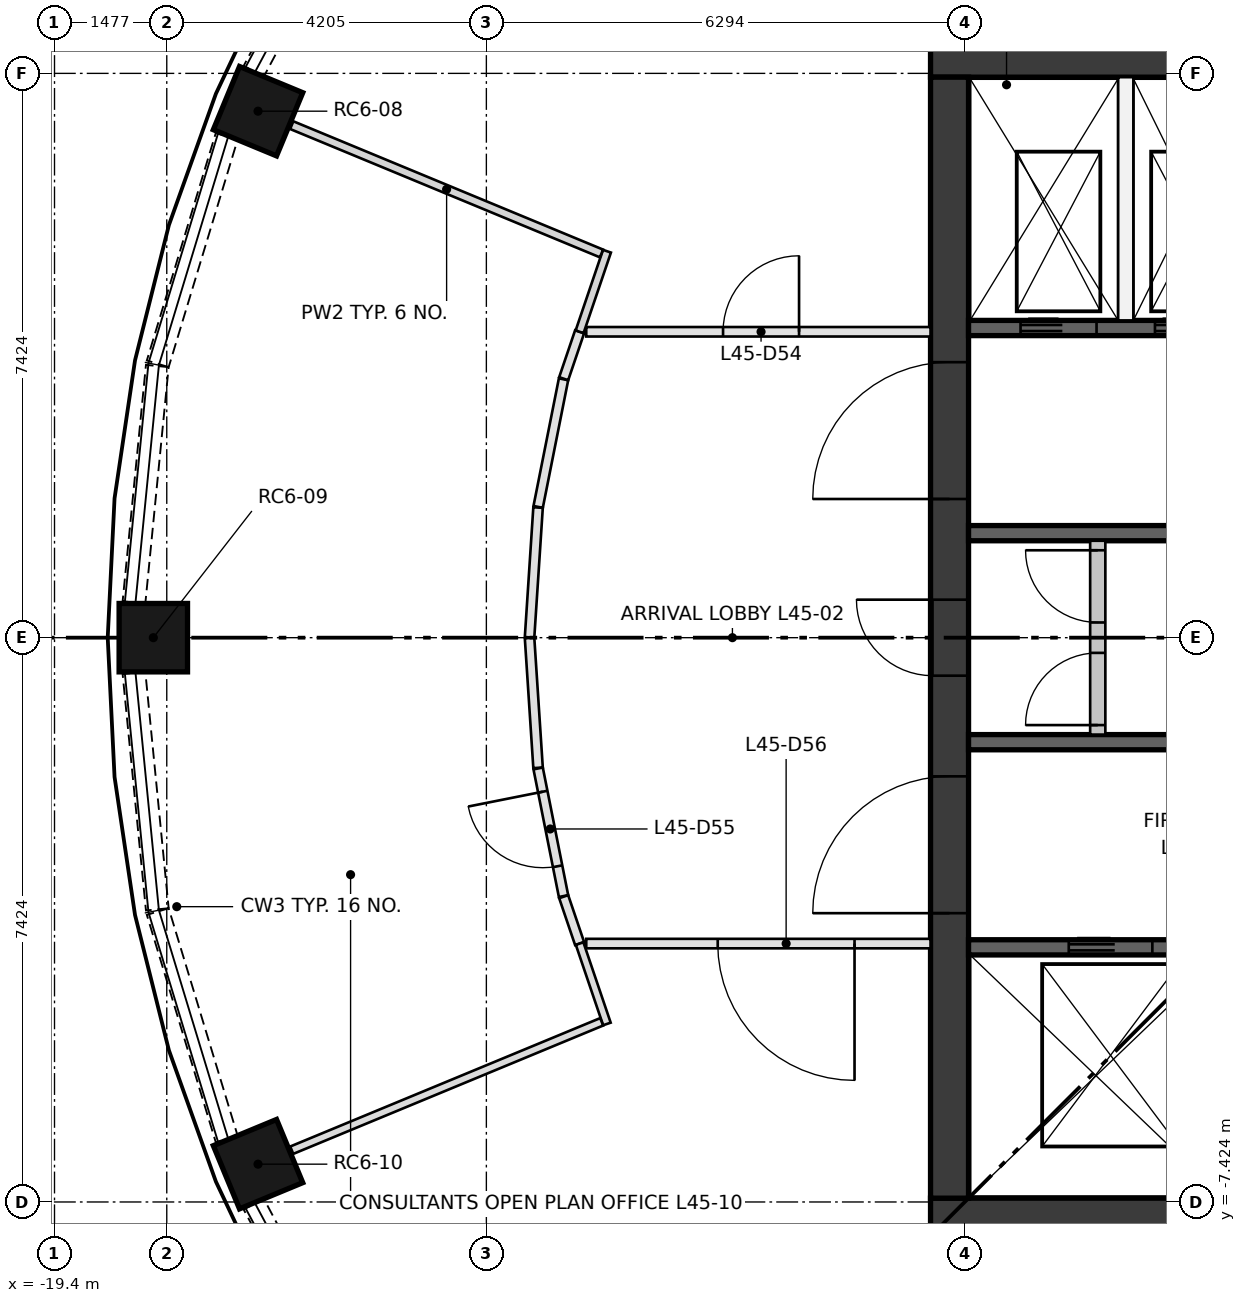
"""IFC4 building model, lengths in metres.
Left out: names, types, materials, properties, quantities, classifications, styles, units other than length and angle.
Written with IfcOpenShell. Run it as: python <this file> out.ifc"""

import sys

from ifc_helpers import new_model, si_unit, direction, frame, frame_2d, origin, origin_2d, place, context, subcontext, project, spatial, rectangle, extrude, element, fill, save


model = new_model("IFC4")
c1 = context("Model", 3, precision=1e-05, world=origin(), true_north=direction((0.0, 1.0)))
c2 = subcontext(c1, "Body", "Model", "MODEL_VIEW")
j1 = project(units=[si_unit("LENGTHUNIT", "METRE"), si_unit("PLANEANGLEUNIT", "RADIAN")], contexts=[c1])
p1 = place(None, origin())
s1 = spatial("IfcSite", under=j1, at=p1, CompositionType="ELEMENT")
p2 = place(p1, origin())
s2 = spatial("IfcBuilding", under=s1, at=p2, CompositionType="ELEMENT")
p3 = place(p2, frame((0.0, 0.0, 170.9)))
s3 = spatial("IfcBuildingStorey", under=s2, at=p3, CompositionType="ELEMENT", Elevation=170.9)
for number, where, z_axis, x_axis in (
    (1, (-16.722, 6.927, 0.0), (0.0, 0.0, 1.0), (-0.924, 0.383, 0.0)),
    (2, (-18.1, 0.0, 0.0), (0.0, 0.0, 1.0), (-1.0, 0.0, 0.0)),
    (3, (-16.722, -6.927, 0.0), (0.0, 0.0, 1.0), (-0.924, -0.383, 0.0)),
):
    element("IfcColumn", number, at=place(p3, frame(where, z_axis=z_axis, x_axis=x_axis)), inside=s3, PredefinedType="COLUMN", context=c2, shape_type="SweptSolid", body=[
        extrude(rectangle(XDim=0.9, YDim=0.9, at=origin_2d()), origin(), (0.0, 0.0, 1.0), 3.35),
    ])
for number, where, z_axis, x_axis in (
    (4, (-7.874, -7.624, 0.0), (0.0, 0.0, 1.0), (1.0, 0.0, 0.0)),
    (5, (-7.874, 7.624, 0.0), (0.0, 0.0, 1.0), (1.0, 0.0, 0.0)),
):
    element("IfcWall", number, at=place(p3, frame(where, z_axis=z_axis, x_axis=x_axis)), inside=s3, PredefinedType="SHEAR", context=c2, shape_type="SweptSolid", body=[
        extrude(rectangle(XDim=15.748, YDim=0.5, at=frame_2d((7.874, 0.0))), origin(), (0.0, 0.0, 1.0), 3.35),
    ])
p4 = place(p3, frame((-7.624, -7.374, 0.0), z_axis=(0.0, 0.0, 1.0), x_axis=(0.0, 1.0, 0.0)))
e6 = element("IfcWall", 6, at=p4, inside=s3, PredefinedType="SHEAR", context=c2, shape_type="SweptSolid", body=[
    extrude(rectangle(XDim=14.748, YDim=0.5, at=frame_2d((7.374, 0.0))), origin(), (0.0, 0.0, 1.0), 3.35),
])
p5 = place(p4, frame((6.874, 0.0, 0.0)))
e7 = element("IfcOpeningElement", 7, at=p5, cuts=e6, PredefinedType="OPENING", context=c2, shape_type="SweptSolid", body=[
    extrude(rectangle(XDim=1.0, YDim=2.1, at=frame_2d((0.5, 1.05))), frame((0.0, 0.26, 0.0), z_axis=(0.0, -1.0, 0.0), x_axis=(1.0, 0.0, 0.0)), (0.0, 0.0, 1.0), 0.52),
])
p6 = place(p4, frame((3.75, 0.0, 0.0)))
e8 = element("IfcOpeningElement", 8, at=p6, cuts=e6, PredefinedType="OPENING", context=c2, shape_type="SweptSolid", body=[
    extrude(rectangle(XDim=1.8, YDim=2.1, at=frame_2d((0.9, 1.05))), frame((0.0, 0.26, 0.0), z_axis=(0.0, -1.0, 0.0), x_axis=(1.0, 0.0, 0.0)), (0.0, 0.0, 1.0), 0.52),
])
p7 = place(p4, frame((9.198, 0.0, 0.0)))
e9 = element("IfcOpeningElement", 9, at=p7, cuts=e6, PredefinedType="OPENING", context=c2, shape_type="SweptSolid", body=[
    extrude(rectangle(XDim=1.8, YDim=2.1, at=frame_2d((0.9, 1.05))), frame((0.0, 0.26, 0.0), z_axis=(0.0, -1.0, 0.0), x_axis=(1.0, 0.0, 0.0)), (0.0, 0.0, 1.0), 0.52),
])
p8 = place(p3, frame((-7.374, -4.074, 0.0), z_axis=(0.0, 0.0, 1.0), x_axis=(1.0, 0.0, 0.0)))
e10 = element("IfcWall", 10, at=p8, inside=s3, PredefinedType="SHEAR", context=c2, shape_type="SweptSolid", body=[
    extrude(rectangle(XDim=14.748, YDim=0.2, at=frame_2d((7.374, 0.0))), origin(), (0.0, 0.0, 1.0), 3.0),
])
p9 = place(p8, frame((1.319, 0.0, 0.0)))
e11 = element("IfcOpeningElement", 11, at=p9, cuts=e10, PredefinedType="OPENING", context=c2, shape_type="SweptSolid", body=[
    extrude(rectangle(XDim=1.1, YDim=2.1, at=frame_2d((0.55, 1.05))), frame((0.0, 0.11, 0.0), z_axis=(0.0, -1.0, 0.0), x_axis=(1.0, 0.0, 0.0)), (0.0, 0.0, 1.0), 0.22),
])
p10 = place(p8, frame((4.456, 0.0, 0.0)))
e12 = element("IfcOpeningElement", 12, at=p10, cuts=e10, PredefinedType="OPENING", context=c2, shape_type="SweptSolid", body=[
    extrude(rectangle(XDim=1.1, YDim=2.1, at=frame_2d((0.55, 1.05))), frame((0.0, 0.11, 0.0), z_axis=(0.0, -1.0, 0.0), x_axis=(1.0, 0.0, 0.0)), (0.0, 0.0, 1.0), 0.22),
])
p11 = place(p8, frame((7.551, 0.0, 0.0)))
e13 = element("IfcOpeningElement", 13, at=p11, cuts=e10, PredefinedType="OPENING", context=c2, shape_type="SweptSolid", body=[
    extrude(rectangle(XDim=1.0, YDim=2.1, at=frame_2d((0.5, 1.05))), frame((0.0, 0.11, 0.0), z_axis=(0.0, -1.0, 0.0), x_axis=(1.0, 0.0, 0.0)), (0.0, 0.0, 1.0), 0.22),
])
p12 = place(p8, frame((9.914, 0.0, 0.0)))
e14 = element("IfcOpeningElement", 14, at=p12, cuts=e10, PredefinedType="OPENING", context=c2, shape_type="SweptSolid", body=[
    extrude(rectangle(XDim=1.0, YDim=2.1, at=frame_2d((0.5, 1.05))), frame((0.0, 0.11, 0.0), z_axis=(0.0, -1.0, 0.0), x_axis=(1.0, 0.0, 0.0)), (0.0, 0.0, 1.0), 0.22),
])
p13 = place(p8, frame((11.688, 0.0, 0.0)))
e15 = element("IfcOpeningElement", 15, at=p13, cuts=e10, PredefinedType="OPENING", context=c2, shape_type="SweptSolid", body=[
    extrude(rectangle(XDim=1.0, YDim=2.1, at=frame_2d((0.5, 1.05))), frame((0.0, 0.11, 0.0), z_axis=(0.0, -1.0, 0.0), x_axis=(1.0, 0.0, 0.0)), (0.0, 0.0, 1.0), 0.22),
])
p14 = place(p8, frame((13.461, 0.0, 0.0)))
e16 = element("IfcOpeningElement", 16, at=p14, cuts=e10, PredefinedType="OPENING", context=c2, shape_type="SweptSolid", body=[
    extrude(rectangle(XDim=1.0, YDim=2.1, at=frame_2d((0.5, 1.05))), frame((0.0, 0.11, 0.0), z_axis=(0.0, -1.0, 0.0), x_axis=(1.0, 0.0, 0.0)), (0.0, 0.0, 1.0), 0.22),
])
p15 = place(p3, frame((-7.374, 4.074, 0.0), z_axis=(0.0, 0.0, 1.0), x_axis=(1.0, 0.0, 0.0)))
e17 = element("IfcWall", 17, at=p15, inside=s3, PredefinedType="SHEAR", context=c2, shape_type="SweptSolid", body=[
    extrude(rectangle(XDim=7.374, YDim=0.2, at=frame_2d((3.687, 0.0))), origin(), (0.0, 0.0, 1.0), 3.0),
])
p16 = place(p15, frame((0.684, 0.0, 0.0)))
e18 = element("IfcOpeningElement", 18, at=p16, cuts=e17, PredefinedType="OPENING", context=c2, shape_type="SweptSolid", body=[
    extrude(rectangle(XDim=1.0, YDim=2.1, at=frame_2d((0.5, 1.05))), frame((0.0, 0.11, 0.0), z_axis=(0.0, -1.0, 0.0), x_axis=(1.0, 0.0, 0.0)), (0.0, 0.0, 1.0), 0.22),
])
p17 = place(p15, frame((2.453, 0.0, 0.0)))
e19 = element("IfcOpeningElement", 19, at=p17, cuts=e17, PredefinedType="OPENING", context=c2, shape_type="SweptSolid", body=[
    extrude(rectangle(XDim=1.0, YDim=2.1, at=frame_2d((0.5, 1.05))), frame((0.0, 0.11, 0.0), z_axis=(0.0, -1.0, 0.0), x_axis=(1.0, 0.0, 0.0)), (0.0, 0.0, 1.0), 0.22),
])
p18 = place(p15, frame((4.221, 0.0, 0.0)))
e20 = element("IfcOpeningElement", 20, at=p18, cuts=e17, PredefinedType="OPENING", context=c2, shape_type="SweptSolid", body=[
    extrude(rectangle(XDim=1.0, YDim=2.1, at=frame_2d((0.5, 1.05))), frame((0.0, 0.11, 0.0), z_axis=(0.0, -1.0, 0.0), x_axis=(1.0, 0.0, 0.0)), (0.0, 0.0, 1.0), 0.22),
])
p19 = place(p15, frame((5.99, 0.0, 0.0)))
e21 = element("IfcOpeningElement", 21, at=p19, cuts=e17, PredefinedType="OPENING", context=c2, shape_type="SweptSolid", body=[
    extrude(rectangle(XDim=1.0, YDim=2.1, at=frame_2d((0.5, 1.05))), frame((0.0, 0.11, 0.0), z_axis=(0.0, -1.0, 0.0), x_axis=(1.0, 0.0, 0.0)), (0.0, 0.0, 1.0), 0.22),
])
for number, where, z_axis, x_axis in (
    (22, (-7.374, -1.375, 0.0), (0.0, 0.0, 1.0), (1.0, 0.0, 0.0)),
    (23, (-7.374, 1.375, 0.0), (0.0, 0.0, 1.0), (1.0, 0.0, 0.0)),
):
    element("IfcWall", number, at=place(p3, frame(where, z_axis=z_axis, x_axis=x_axis)), inside=s3, PredefinedType="SHEAR", context=c2, shape_type="SweptSolid", body=[
        extrude(rectangle(XDim=3.0, YDim=0.2, at=frame_2d((1.5, 0.0))), origin(), (0.0, 0.0, 1.0), 3.0),
    ])
p20 = place(p3, frame((-5.305, 4.174, 0.0), z_axis=(0.0, 0.0, 1.0), x_axis=(0.0, 1.0, 0.0)))
e24 = element("IfcWall", 24, at=p20, inside=s3, PredefinedType="PARTITIONING", context=c2, shape_type="SweptSolid", body=[
    extrude(rectangle(XDim=3.2, YDim=0.2, at=frame_2d((1.6, 0.0))), origin(), (0.0, 0.0, 1.0), 3.0),
])
p21 = place(p3, frame((-5.674, -1.275, 0.0), z_axis=(0.0, 0.0, 1.0), x_axis=(0.0, 1.0, 0.0)))
e25 = element("IfcWall", 25, at=p21, inside=s3, PredefinedType="PARTITIONING", context=c2, shape_type="SweptSolid", body=[
    extrude(rectangle(XDim=2.55, YDim=0.2, at=frame_2d((1.275, 0.0))), origin(), (0.0, 0.0, 1.0), 3.0),
])
p22 = place(p21, frame((0.125, 0.0, 0.0)))
e26 = element("IfcOpeningElement", 26, at=p22, cuts=e25, PredefinedType="OPENING", context=c2, shape_type="SweptSolid", body=[
    extrude(rectangle(XDim=0.95, YDim=2.1, at=frame_2d((0.475, 1.05))), frame((0.0, 0.11, 0.0), z_axis=(0.0, -1.0, 0.0), x_axis=(1.0, 0.0, 0.0)), (0.0, 0.0, 1.0), 0.22),
])
p23 = place(p21, frame((1.475, 0.0, 0.0)))
e27 = element("IfcOpeningElement", 27, at=p23, cuts=e25, PredefinedType="OPENING", context=c2, shape_type="SweptSolid", body=[
    extrude(rectangle(XDim=0.95, YDim=2.1, at=frame_2d((0.475, 1.05))), frame((0.0, 0.11, 0.0), z_axis=(0.0, -1.0, 0.0), x_axis=(1.0, 0.0, 0.0)), (0.0, 0.0, 1.0), 0.22),
])
p24 = place(p3, frame((-15.306, 10.209, 0.0), z_axis=(0.0, 0.0, 1.0), x_axis=(-0.47120441036, -0.882024038027, 0.0)))
e28 = element("IfcWall", 28, at=p24, inside=s3, PredefinedType="SOLIDWALL", context=c2, shape_type="SweptSolid", body=[
    extrude(rectangle(XDim=3.125, YDim=0.3, at=frame_2d((1.562, 0.0))), origin(), (0.0, 0.0, 1.0), 0.9),
])
p25 = place(p3, frame((-17.135, 6.596, 0.0), z_axis=(0.0, 0.0, 1.0), x_axis=(-0.290083245834, -0.957001416136, 0.0)))
e29 = element("IfcWall", 29, at=p25, inside=s3, PredefinedType="SOLIDWALL", context=c2, shape_type="SweptSolid", body=[
    extrude(rectangle(XDim=3.127, YDim=0.3, at=frame_2d((1.563, 0.0))), origin(), (0.0, 0.0, 1.0), 0.9),
])
for number, where, z_axis, x_axis in (
    (30, (-18.048, 3.574, 0.0), (0.0, 0.0, 1.0), (-0.098, -0.995, 0.0)),
    (31, (-18.354, -0.464, 0.0), (0.0, 0.0, 1.0), (0.098, -0.995, 0.0)),
):
    element("IfcWall", number, at=place(p3, frame(where, z_axis=z_axis, x_axis=x_axis)), inside=s3, PredefinedType="SOLIDWALL", context=c2, shape_type="SweptSolid", body=[
        extrude(rectangle(XDim=3.125, YDim=0.3, at=frame_2d((1.563, 0.0))), origin(), (0.0, 0.0, 1.0), 0.9),
    ])
p26 = place(p3, frame((-18.042, -3.604, 0.0), z_axis=(0.0, 0.0, 1.0), x_axis=(0.290083245834, -0.957001416136, 0.0)))
e32 = element("IfcWall", 32, at=p26, inside=s3, PredefinedType="SOLIDWALL", context=c2, shape_type="SweptSolid", body=[
    extrude(rectangle(XDim=3.127, YDim=0.3, at=frame_2d((1.563, 0.0))), origin(), (0.0, 0.0, 1.0), 0.9),
])
p27 = place(p3, frame((-16.779, -7.452, 0.0), z_axis=(0.0, 0.0, 1.0), x_axis=(0.47120441036, -0.882024038027, 0.0)))
e33 = element("IfcWall", 33, at=p27, inside=s3, PredefinedType="SOLIDWALL", context=c2, shape_type="SweptSolid", body=[
    extrude(rectangle(XDim=3.125, YDim=0.3, at=frame_2d((1.562, 0.0))), origin(), (0.0, 0.0, 1.0), 0.9),
])
p28 = place(p3, frame((-12.404, 4.024, 0.0), z_axis=(0.0, 0.0, 1.0), x_axis=(1.0, 0.0, 0.0)))
e34 = element("IfcWall", 34, at=p28, inside=s3, PredefinedType="PARTITIONING", context=c2, shape_type="SweptSolid", body=[
    extrude(rectangle(XDim=4.53, YDim=0.125, at=frame_2d((2.265, 0.0))), origin(), (0.0, 0.0, 1.0), 3.0),
])
p29 = place(p28, frame((1.8, 0.0, 0.0)))
e35 = element("IfcOpeningElement", 35, at=p29, cuts=e34, PredefinedType="OPENING", context=c2, shape_type="SweptSolid", body=[
    extrude(rectangle(XDim=1.0, YDim=2.1, at=frame_2d((0.5, 1.05))), frame((0.0, 0.073, 0.0), z_axis=(0.0, -1.0, 0.0), x_axis=(1.0, 0.0, 0.0)), (0.0, 0.0, 1.0), 0.145),
])
for number, where, z_axis, x_axis in (
    (36, (-13.15, 0.004, 0.0), (0.0, 0.0, 1.0), (0.065, 0.998, 0.0)),
    (37, (-13.038, -1.712, 0.0), (0.0, 0.0, 1.0), (-0.065, 0.998, 0.0)),
    (38, (-13.037, 1.72, 0.0), (0.0, 0.0, 1.0), (0.195, 0.981, 0.0)),
):
    element("IfcWall", number, at=place(p3, frame(where, z_axis=z_axis, x_axis=x_axis)), inside=s3, PredefinedType="PARTITIONING", context=c2, shape_type="SweptSolid", body=[
        extrude(rectangle(XDim=1.712, YDim=0.125, at=frame_2d((0.856, 0.0))), origin(), (0.0, 0.0, 1.0), 3.0),
    ])
p30 = place(p3, frame((-12.703, -3.399, 0.0), z_axis=(0.0, 0.0, 1.0), x_axis=(-0.195101249107, 0.980783106806, 0.0)))
e39 = element("IfcWall", 39, at=p30, inside=s3, PredefinedType="PARTITIONING", context=c2, shape_type="SweptSolid", body=[
    extrude(rectangle(XDim=1.712, YDim=0.125, at=frame_2d((0.856, 0.0))), origin(), (0.0, 0.0, 1.0), 3.0),
])
p31 = place(p30, frame((0.4, 0.0, 0.0)))
e40 = element("IfcOpeningElement", 40, at=p31, cuts=e39, PredefinedType="OPENING", context=c2, shape_type="SweptSolid", body=[
    extrude(rectangle(XDim=1.0, YDim=2.1, at=frame_2d((0.5, 1.05))), frame((0.0, 0.073, 0.0), z_axis=(0.0, -1.0, 0.0), x_axis=(1.0, 0.0, 0.0)), (0.0, 0.0, 1.0), 0.145),
])
for number, where, z_axis, x_axis in (
    (41, (-12.701, 3.407, 0.0), (0.0, 0.0, 1.0), (0.322, 0.947, 0.0)),
    (42, (-12.491, -4.024, 0.0), (0.0, 0.0, 1.0), (-0.322, 0.947, 0.0)),
):
    element("IfcWall", number, at=place(p3, frame(where, z_axis=z_axis, x_axis=x_axis)), inside=s3, PredefinedType="PARTITIONING", context=c2, shape_type="SweptSolid", body=[
        extrude(rectangle(XDim=0.652, YDim=0.125, at=frame_2d((0.326, 0.0))), origin(), (0.0, 0.0, 1.0), 3.0),
    ])
p32 = place(p3, frame((-7.874, -4.024, 0.0), z_axis=(0.0, 0.0, 1.0), x_axis=(-1.0, 0.0, 0.0)))
e43 = element("IfcWall", 43, at=p32, inside=s3, PredefinedType="PARTITIONING", context=c2, shape_type="SweptSolid", body=[
    extrude(rectangle(XDim=4.53, YDim=0.125, at=frame_2d((2.265, 0.0))), origin(), (0.0, 0.0, 1.0), 3.0),
])
p33 = place(p32, frame((1.0, 0.0, 0.0)))
e44 = element("IfcOpeningElement", 44, at=p33, cuts=e43, PredefinedType="OPENING", context=c2, shape_type="SweptSolid", body=[
    extrude(rectangle(XDim=1.8, YDim=2.1, at=frame_2d((0.9, 1.05))), frame((0.0, 0.073, 0.0), z_axis=(0.0, -1.0, 0.0), x_axis=(1.0, 0.0, 0.0)), (0.0, 0.0, 1.0), 0.145),
])
p34 = place(p3, frame((-12.491, 4.024, 0.0), z_axis=(0.0, 0.0, 1.0), x_axis=(0.321456988234, 0.946924181081, 0.0)))
e45 = element("IfcWall", 45, at=p34, inside=s3, PredefinedType="PARTITIONING", context=c2, shape_type="SweptSolid", body=[
    extrude(rectangle(XDim=1.119, YDim=0.11, at=frame_2d((0.56, 0.0))), origin(), (0.0, 0.0, 1.0), 3.0),
])
p35 = place(p3, frame((-12.203, 5.055, 0.0), z_axis=(0.0, 0.0, 1.0), x_axis=(-0.923869102729, 0.382708611117, 0.0)))
e46 = element("IfcWall", 46, at=p35, inside=s3, PredefinedType="PARTITIONING", context=c2, shape_type="SweptSolid", body=[
    extrude(rectangle(XDim=4.411, YDim=0.11, at=frame_2d((2.206, 0.0))), origin(), (0.0, 0.0, 1.0), 3.0),
])
p36 = place(p3, frame((-12.491, -4.024, 0.0), z_axis=(0.0, 0.0, 1.0), x_axis=(0.321534356008, -0.946897913139, 0.0)))
e47 = element("IfcWall", 47, at=p36, inside=s3, PredefinedType="PARTITIONING", context=c2, shape_type="SweptSolid", body=[
    extrude(rectangle(XDim=1.117, YDim=0.105, at=frame_2d((0.559, 0.0))), origin(), (0.0, 0.0, 1.0), 3.0),
])
p37 = place(p3, frame((-12.201, -5.054, 0.0), z_axis=(0.0, 0.0, 1.0), x_axis=(-0.923879989031, -0.382682330227, 0.0)))
e48 = element("IfcWall", 48, at=p37, inside=s3, PredefinedType="PARTITIONING", context=c2, shape_type="SweptSolid", body=[
    extrude(rectangle(XDim=4.414, YDim=0.105, at=frame_2d((2.207, 0.0))), origin(), (0.0, 0.0, 1.0), 3.0),
])
p38 = place(p9, origin())
e49 = element("IfcDoor", 49, at=p38, inside=s3, OperationType="DOUBLE_DOOR_SLIDING", PredefinedType="DOOR", context=c2, shape_type="SweptSolid", body=[
    extrude(rectangle(XDim=1.1, YDim=2.1, at=frame_2d((0.55, 1.05))), frame((0.0, 0.025, 0.0), z_axis=(0.0, -1.0, 0.0), x_axis=(1.0, 0.0, 0.0)), (0.0, 0.0, 1.0), 0.05),
])
fill(e11, e49)
p39 = place(p16, frame((1.0, 0.0, 0.0), z_axis=(0.0, 0.0, 1.0), x_axis=(-1.0, 0.0, 0.0)))
e50 = element("IfcDoor", 50, at=p39, inside=s3, OperationType="DOUBLE_DOOR_SLIDING", PredefinedType="DOOR", context=c2, shape_type="SweptSolid", body=[
    extrude(rectangle(XDim=1.0, YDim=2.1, at=frame_2d((0.5, 1.05))), frame((0.0, 0.025, 0.0), z_axis=(0.0, -1.0, 0.0), x_axis=(1.0, 0.0, 0.0)), (0.0, 0.0, 1.0), 0.05),
])
fill(e18, e50)
p40 = place(p17, frame((1.0, 0.0, 0.0), z_axis=(0.0, 0.0, 1.0), x_axis=(-1.0, 0.0, 0.0)))
e51 = element("IfcDoor", 51, at=p40, inside=s3, OperationType="DOUBLE_DOOR_SLIDING", PredefinedType="DOOR", context=c2, shape_type="SweptSolid", body=[
    extrude(rectangle(XDim=1.0, YDim=2.1, at=frame_2d((0.5, 1.05))), frame((0.0, 0.025, 0.0), z_axis=(0.0, -1.0, 0.0), x_axis=(1.0, 0.0, 0.0)), (0.0, 0.0, 1.0), 0.05),
])
fill(e19, e51)
p41 = place(p22, origin())
e52 = element("IfcDoor", 52, at=p41, inside=s3, OperationType="SINGLE_SWING_LEFT", PredefinedType="DOOR", context=c2, shape_type="SweptSolid", body=[
    extrude(rectangle(XDim=0.95, YDim=2.1, at=frame_2d((0.475, 1.05))), frame((0.0, 0.025, 0.0), z_axis=(0.0, -1.0, 0.0), x_axis=(1.0, 0.0, 0.0)), (0.0, 0.0, 1.0), 0.05),
])
fill(e26, e52)
p42 = place(p23, origin())
e53 = element("IfcDoor", 53, at=p42, inside=s3, OperationType="SINGLE_SWING_RIGHT", PredefinedType="DOOR", context=c2, shape_type="SweptSolid", body=[
    extrude(rectangle(XDim=0.95, YDim=2.1, at=frame_2d((0.475, 1.05))), frame((0.0, 0.025, 0.0), z_axis=(0.0, -1.0, 0.0), x_axis=(1.0, 0.0, 0.0)), (0.0, 0.0, 1.0), 0.05),
])
fill(e27, e53)
p43 = place(p5, origin())
e54 = element("IfcDoor", 54, at=p43, inside=s3, OperationType="SINGLE_SWING_RIGHT", PredefinedType="DOOR", context=c2, shape_type="SweptSolid", body=[
    extrude(rectangle(XDim=1.0, YDim=2.1, at=frame_2d((0.5, 1.05))), frame((0.0, 0.25, 0.0), z_axis=(0.0, -1.0, 0.0), x_axis=(1.0, 0.0, 0.0)), (0.0, 0.0, 1.0), 0.05),
])
fill(e7, e54)
p44 = place(p6, origin())
e55 = element("IfcDoor", 55, at=p44, inside=s3, OperationType="DOUBLE_DOOR_SINGLE_SWING", PredefinedType="DOOR", context=c2, shape_type="SweptSolid", body=[
    extrude(rectangle(XDim=1.8, YDim=2.1, at=frame_2d((0.9, 1.05))), frame((0.0, 0.025, 0.0), z_axis=(0.0, -1.0, 0.0), x_axis=(1.0, 0.0, 0.0)), (0.0, 0.0, 1.0), 0.05),
])
fill(e8, e55)
p45 = place(p7, origin())
e56 = element("IfcDoor", 56, at=p45, inside=s3, OperationType="DOUBLE_DOOR_SINGLE_SWING", PredefinedType="DOOR", context=c2, shape_type="SweptSolid", body=[
    extrude(rectangle(XDim=1.8, YDim=2.1, at=frame_2d((0.9, 1.05))), frame((0.0, 0.025, 0.0), z_axis=(0.0, -1.0, 0.0), x_axis=(1.0, 0.0, 0.0)), (0.0, 0.0, 1.0), 0.05),
])
fill(e9, e56)
p46 = place(p29, origin())
e57 = element("IfcDoor", 57, at=p46, inside=s3, OperationType="SINGLE_SWING_RIGHT", PredefinedType="DOOR", context=c2, shape_type="SweptSolid", body=[
    extrude(rectangle(XDim=1.0, YDim=2.1, at=frame_2d((0.5, 1.05))), frame((0.0, 0.025, 0.0), z_axis=(0.0, -1.0, 0.0), x_axis=(1.0, 0.0, 0.0)), (0.0, 0.0, 1.0), 0.05),
])
fill(e35, e57)
p47 = place(p31, origin())
e58 = element("IfcDoor", 58, at=p47, inside=s3, OperationType="SINGLE_SWING_RIGHT", PredefinedType="DOOR", context=c2, shape_type="SweptSolid", body=[
    extrude(rectangle(XDim=1.0, YDim=2.1, at=frame_2d((0.5, 1.05))), frame((0.0, 0.025, 0.0), z_axis=(0.0, -1.0, 0.0), x_axis=(1.0, 0.0, 0.0)), (0.0, 0.0, 1.0), 0.05),
])
fill(e40, e58)
p48 = place(p33, origin())
e59 = element("IfcDoor", 59, at=p48, inside=s3, OperationType="DOUBLE_DOOR_SINGLE_SWING", PredefinedType="DOOR", context=c2, shape_type="SweptSolid", body=[
    extrude(rectangle(XDim=1.8, YDim=2.1, at=frame_2d((0.9, 1.05))), frame((0.0, 0.025, 0.0), z_axis=(0.0, -1.0, 0.0), x_axis=(1.0, 0.0, 0.0)), (0.0, 0.0, 1.0), 0.05),
])
fill(e44, e59)
save(model, sys.argv[1])
